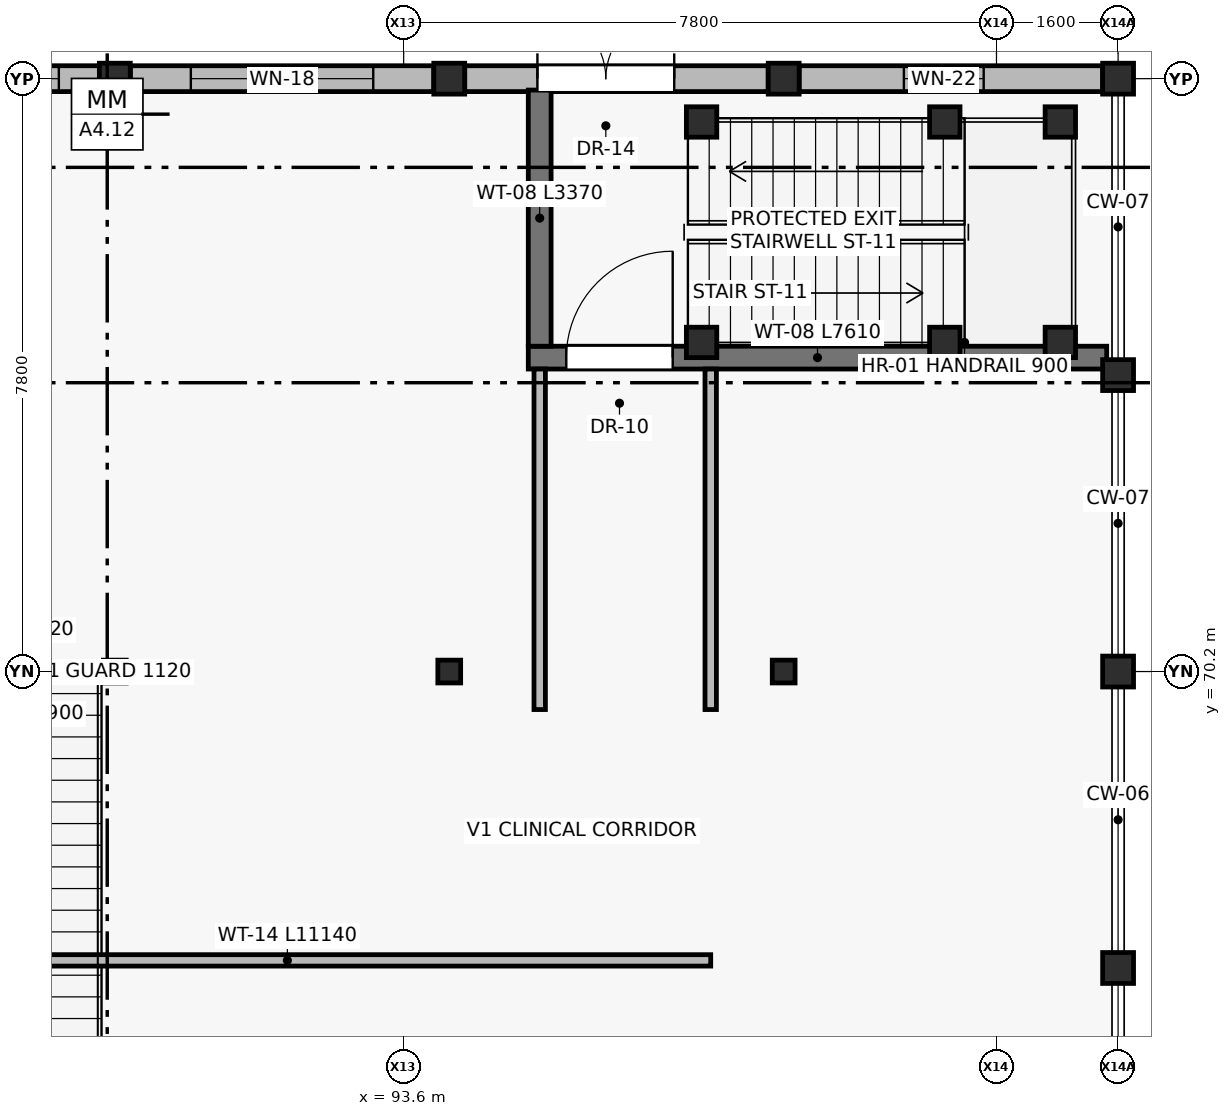
"""IFC4 building model, lengths in metres.
Left out: names, types, materials, properties, quantities, classifications, styles, units other than length and angle.
Written with IfcOpenShell. Run it as: python <this file> out.ifc"""

import sys

from ifc_helpers import new_model, si_unit, direction, frame, frame_2d, origin, origin_2d, place, context, subcontext, project, spatial, rectangle, hollow_circle, i_section, extrude, element, fill, save


model = new_model("IFC4")
c1 = context("Model", 3, precision=1e-05, world=origin(), true_north=direction((0.0, 1.0)))
c2 = subcontext(c1, "Body", "Model", "MODEL_VIEW")
j1 = project(units=[si_unit("LENGTHUNIT", "METRE"), si_unit("PLANEANGLEUNIT", "RADIAN")], contexts=[c1])
p1 = place(None, origin())
s1 = spatial("IfcSite", under=j1, at=p1, CompositionType="ELEMENT")
p2 = place(p1, origin())
s2 = spatial("IfcBuilding", under=s1, at=p2, CompositionType="ELEMENT")
p3 = place(p2, origin())
s3 = spatial("IfcBuildingStorey", under=s2, at=p3, CompositionType="ELEMENT", Elevation=0.0)
for number, where, z_axis, x_axis in (
    (1, (89.8, 78.0, 0.0), (0.0, 0.0, 1.0), (1.0, 0.0, 0.0)),
    (2, (94.2, 78.0, 0.0), (0.0, 0.0, 1.0), (1.0, 0.0, 0.0)),
    (3, (98.6, 78.0, 0.0), (0.0, 0.0, 1.0), (1.0, 0.0, 0.0)),
    (4, (103.0, 78.0, 0.0), (0.0, 0.0, 1.0), (1.0, 0.0, 0.0)),
    (5, (103.0, 66.3, 0.0), (0.0, 0.0, 1.0), (1.0, 0.0, 0.0)),
    (6, (103.0, 70.2, 0.0), (0.0, 0.0, 1.0), (1.0, 0.0, 0.0)),
    (7, (103.0, 74.1, 0.0), (0.0, 0.0, 1.0), (1.0, 0.0, 0.0)),
):
    element("IfcColumn", number, at=place(p3, frame(where, z_axis=z_axis, x_axis=x_axis)), inside=s3, PredefinedType="COLUMN", context=c2, shape_type="SweptSolid", body=[
        extrude(hollow_circle(Radius=0.203, WallThickness=0.016, at=origin_2d()), origin(), (0.0, 0.0, 1.0), 4.8),
    ])
for number, where, z_axis, x_axis in (
    (8, (89.8, 70.2, 0.0), (0.0, 0.0, 1.0), (1.0, 0.0, 0.0)),
    (9, (94.2, 70.2, 0.0), (0.0, 0.0, 1.0), (1.0, 0.0, 0.0)),
    (10, (98.6, 70.2, 0.0), (0.0, 0.0, 1.0), (1.0, 0.0, 0.0)),
):
    element("IfcColumn", number, at=place(p3, frame(where, z_axis=z_axis, x_axis=x_axis)), inside=s3, PredefinedType="COLUMN", context=c2, shape_type="SweptSolid", body=[
        extrude(i_section(OverallWidth=0.3, OverallDepth=0.3, WebThickness=0.011, FlangeThickness=0.019, at=origin_2d()), origin(), (0.0, 0.0, 1.0), 4.8),
    ])
for number, where, z_axis, x_axis in (
    (11, (97.52, 74.53, 0.0), (0.0, 0.0, 1.0), (1.0, 0.0, 0.0)),
    (12, (97.52, 77.43, 0.0), (0.0, 0.0, 1.0), (1.0, 0.0, 0.0)),
    (13, (100.72, 74.53, 0.0), (0.0, 0.0, 1.0), (1.0, 0.0, 0.0)),
    (14, (100.72, 77.43, 0.0), (0.0, 0.0, 1.0), (1.0, 0.0, 0.0)),
    (15, (102.24, 74.53, 0.0), (0.0, 0.0, 1.0), (1.0, 0.0, 0.0)),
    (16, (102.24, 77.43, 0.0), (0.0, 0.0, 1.0), (1.0, 0.0, 0.0)),
):
    element("IfcColumn", number, at=place(p3, frame(where, z_axis=z_axis, x_axis=x_axis)), inside=s3, PredefinedType="COLUMN", context=c2, shape_type="SweptSolid", body=[
        extrude(rectangle(XDim=0.4, YDim=0.4, at=origin_2d()), origin(), (0.0, 0.0, 1.0), 4.8),
    ])
p4 = place(p3, frame((85.603, 78.0, 0.0), z_axis=(0.0, 0.0, 1.0), x_axis=(1.0, 0.0, 0.0)))
e17 = element("IfcWall", 17, at=p4, inside=s3, PredefinedType="STANDARD", context=c2, shape_type="SweptSolid", body=[
    extrude(rectangle(XDim=3.993, YDim=0.34, at=frame_2d((1.997, 0.0))), origin(), (0.0, 0.0, 1.0), 4.14),
])
p5 = place(p4, frame((1.51, 0.0, 0.9)))
e18 = element("IfcOpeningElement", 18, at=p5, cuts=e17, PredefinedType="OPENING", context=c2, shape_type="SweptSolid", body=[
    extrude(rectangle(XDim=1.95, YDim=2.15, at=frame_2d((0.975, 1.075))), frame((0.0, 0.18, 0.0), z_axis=(0.0, -1.0, 0.0), x_axis=(1.0, 0.0, 0.0)), (0.0, 0.0, 1.0), 0.36),
])
p6 = place(p3, frame((90.003, 78.0, 0.0), z_axis=(0.0, 0.0, 1.0), x_axis=(1.0, 0.0, 0.0)))
e19 = element("IfcWall", 19, at=p6, inside=s3, PredefinedType="STANDARD", context=c2, shape_type="SweptSolid", body=[
    extrude(rectangle(XDim=3.994, YDim=0.34, at=frame_2d((1.997, 0.0))), origin(), (0.0, 0.0, 1.0), 4.14),
])
p7 = place(p6, frame((0.797, 0.0, 0.9)))
e20 = element("IfcOpeningElement", 20, at=p7, cuts=e19, PredefinedType="OPENING", context=c2, shape_type="SweptSolid", body=[
    extrude(rectangle(XDim=2.4, YDim=1.6, at=frame_2d((1.2, 0.8))), frame((0.0, 0.18, 0.0), z_axis=(0.0, -1.0, 0.0), x_axis=(1.0, 0.0, 0.0)), (0.0, 0.0, 1.0), 0.36),
])
p8 = place(p3, frame((94.403, 78.0, 0.0), z_axis=(0.0, 0.0, 1.0), x_axis=(1.0, 0.0, 0.0)))
e21 = element("IfcWall", 21, at=p8, inside=s3, PredefinedType="STANDARD", context=c2, shape_type="SweptSolid", body=[
    extrude(rectangle(XDim=3.993, YDim=0.34, at=frame_2d((1.997, 0.0))), origin(), (0.0, 0.0, 1.0), 4.14),
])
p9 = place(p8, frame((0.957, 0.0, 0.0)))
e22 = element("IfcOpeningElement", 22, at=p9, cuts=e21, PredefinedType="OPENING", context=c2, shape_type="SweptSolid", body=[
    extrude(rectangle(XDim=1.8, YDim=2.25, at=frame_2d((0.9, 1.125))), frame((0.0, 0.18, 0.0), z_axis=(0.0, -1.0, 0.0), x_axis=(1.0, 0.0, 0.0)), (0.0, 0.0, 1.0), 0.36),
])
p10 = place(p3, frame((98.803, 78.0, 0.0), z_axis=(0.0, 0.0, 1.0), x_axis=(1.0, 0.0, 0.0)))
e23 = element("IfcWall", 23, at=p10, inside=s3, PredefinedType="STANDARD", context=c2, shape_type="SweptSolid", body=[
    extrude(rectangle(XDim=3.994, YDim=0.34, at=frame_2d((1.997, 0.0))), origin(), (0.0, 0.0, 1.0), 4.14),
])
p11 = place(p10, frame((1.378, 0.0, 0.9)))
e24 = element("IfcOpeningElement", 24, at=p11, cuts=e23, PredefinedType="OPENING", context=c2, shape_type="SweptSolid", body=[
    extrude(rectangle(XDim=1.05, YDim=2.05, at=frame_2d((0.525, 1.025))), frame((0.0, 0.18, 0.0), z_axis=(0.0, -1.0, 0.0), x_axis=(1.0, 0.0, 0.0)), (0.0, 0.0, 1.0), 0.36),
])
p12 = place(p3, frame((95.24, 74.33, 0.0), z_axis=(0.0, 0.0, 1.0), x_axis=(1.0, 0.0, 0.0)))
e25 = element("IfcWall", 25, at=p12, inside=s3, PredefinedType="SHEAR", context=c2, shape_type="SweptSolid", body=[
    extrude(rectangle(XDim=7.61, YDim=0.3, at=frame_2d((3.805, 0.0))), origin(), (0.0, 0.0, 1.0), 4.54),
])
p13 = place(p12, frame((0.5, 0.0, 0.0)))
e26 = element("IfcOpeningElement", 26, at=p13, cuts=e25, PredefinedType="OPENING", context=c2, shape_type="SweptSolid", body=[
    extrude(rectangle(XDim=1.4, YDim=2.2, at=frame_2d((0.7, 1.1))), frame((0.0, 0.16, 0.0), z_axis=(0.0, -1.0, 0.0), x_axis=(1.0, 0.0, 0.0)), (0.0, 0.0, 1.0), 0.32),
])
p14 = place(p3, frame((95.39, 77.85, 0.0), z_axis=(0.0, 0.0, 1.0), x_axis=(0.0, -1.0, 0.0)))
e27 = element("IfcWall", 27, at=p14, inside=s3, PredefinedType="SHEAR", context=c2, shape_type="SweptSolid", body=[
    extrude(rectangle(XDim=3.37, YDim=0.3, at=frame_2d((1.685, 0.0))), origin(), (0.0, 0.0, 1.0), 4.54),
])
for number, where, z_axis, x_axis in (
    (28, (95.39, 69.7, 0.0), (0.0, 0.0, 1.0), (0.0, 1.0, 0.0)),
    (29, (97.64, 69.7, 0.0), (0.0, 0.0, 1.0), (0.0, 1.0, 0.0)),
):
    element("IfcWall", number, at=place(p3, frame(where, z_axis=z_axis, x_axis=x_axis)), inside=s3, PredefinedType="PARTITIONING", context=c2, shape_type="SweptSolid", body=[
        extrude(rectangle(XDim=4.48, YDim=0.15, at=frame_2d((2.24, 0.0))), origin(), (0.0, 0.0, 1.0), 4.54),
    ])
p15 = place(p3, frame((86.5, 66.4, 0.0), z_axis=(0.0, 0.0, 1.0), x_axis=(1.0, 0.0, 0.0)))
e30 = element("IfcWall", 30, at=p15, inside=s3, PredefinedType="PARTITIONING", context=c2, shape_type="SweptSolid", body=[
    extrude(rectangle(XDim=11.14, YDim=0.15, at=frame_2d((5.57, 0.0))), origin(), (0.0, 0.0, 1.0), 4.54),
])
p16 = place(p5, origin())
e31 = element("IfcWindow", 31, at=p16, inside=s3, PartitioningType="SINGLE_PANEL", PredefinedType="WINDOW", context=c2, shape_type="SweptSolid", body=[
    extrude(rectangle(XDim=1.95, YDim=2.15, at=frame_2d((0.975, 1.075))), frame((0.0, 0.03, 0.0), z_axis=(0.0, -1.0, 0.0), x_axis=(1.0, 0.0, 0.0)), (0.0, 0.0, 1.0), 0.06),
])
fill(e18, e31)
p17 = place(p7, origin())
e32 = element("IfcWindow", 32, at=p17, inside=s3, PartitioningType="SINGLE_PANEL", PredefinedType="WINDOW", context=c2, shape_type="SweptSolid", body=[
    extrude(rectangle(XDim=2.4, YDim=1.6, at=frame_2d((1.2, 0.8))), frame((0.0, 0.03, 0.0), z_axis=(0.0, -1.0, 0.0), x_axis=(1.0, 0.0, 0.0)), (0.0, 0.0, 1.0), 0.06),
])
fill(e20, e32)
p18 = place(p9, origin())
e33 = element("IfcDoor", 33, at=p18, inside=s3, OperationType="DOUBLE_DOOR_SINGLE_SWING", PredefinedType="DOOR", context=c2, shape_type="SweptSolid", body=[
    extrude(rectangle(XDim=1.8, YDim=2.25, at=frame_2d((0.9, 1.125))), frame((0.0, 0.025, 0.0), z_axis=(0.0, -1.0, 0.0), x_axis=(1.0, 0.0, 0.0)), (0.0, 0.0, 1.0), 0.05),
])
fill(e22, e33)
p19 = place(p11, origin())
e34 = element("IfcWindow", 34, at=p19, inside=s3, PartitioningType="SINGLE_PANEL", PredefinedType="WINDOW", context=c2, shape_type="SweptSolid", body=[
    extrude(rectangle(XDim=1.05, YDim=2.05, at=frame_2d((0.525, 1.025))), frame((0.0, 0.03, 0.0), z_axis=(0.0, -1.0, 0.0), x_axis=(1.0, 0.0, 0.0)), (0.0, 0.0, 1.0), 0.06),
])
fill(e24, e34)
p20 = place(p13, origin())
e35 = element("IfcDoor", 35, at=p20, inside=s3, OperationType="SINGLE_SWING_RIGHT", PredefinedType="DOOR", context=c2, shape_type="SweptSolid", body=[
    extrude(rectangle(XDim=1.4, YDim=2.2, at=frame_2d((0.7, 1.1))), frame((0.0, 0.025, 0.0), z_axis=(0.0, -1.0, 0.0), x_axis=(1.0, 0.0, 0.0)), (0.0, 0.0, 1.0), 0.05),
])
fill(e26, e35)
save(model, sys.argv[1])
